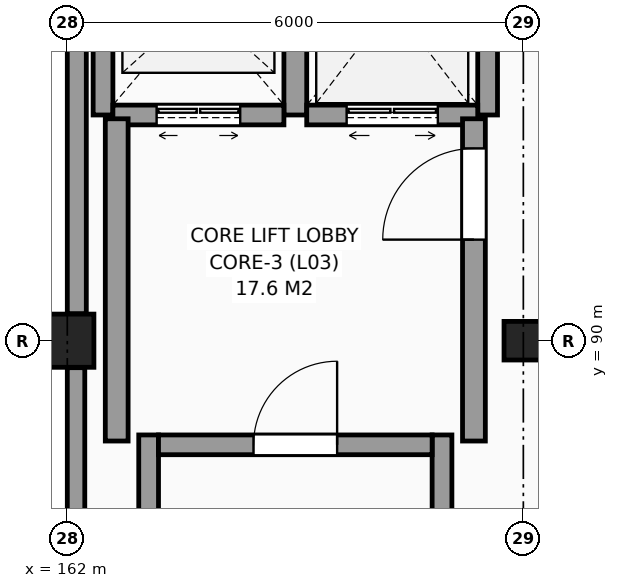
"""IFC4 building model, lengths in metres.
Left out: names, types, materials, properties, quantities, classifications, styles, units other than length and angle.
Written with IfcOpenShell. Run it as: python <this file> out.ifc"""

import sys

from ifc_helpers import new_model, si_unit, direction, frame, frame_2d, origin, origin_2d, place, context, subcontext, project, spatial, rectangle, circle, hollow_circle, extrude, element, fill, save


model = new_model("IFC4")
c1 = context("Model", 3, precision=1e-05, world=origin(), true_north=direction((0.0, 1.0)))
c2 = subcontext(c1, "Body", "Model", "MODEL_VIEW")
j1 = project(units=[si_unit("LENGTHUNIT", "METRE"), si_unit("PLANEANGLEUNIT", "RADIAN")], contexts=[c1])
p1 = place(None, origin())
s1 = spatial("IfcSite", under=j1, at=p1, CompositionType="ELEMENT")
p2 = place(p1, origin())
s2 = spatial("IfcBuilding", under=s1, at=p2, CompositionType="ELEMENT")
p3 = place(p2, frame((0.0, 0.0, 15.0)))
s3 = spatial("IfcBuildingStorey", under=s2, at=p3, CompositionType="ELEMENT", Elevation=15.0)
p4 = place(p3, frame((162.0, 90.0, 0.0), z_axis=(0.0, 0.0, 1.0), x_axis=(1.0, 0.0, 0.0)))
e1 = element("IfcColumn", 1, at=p4, inside=s3, PredefinedType="COLUMN", context=c2, shape_type="SweptSolid", body=[
    extrude(circle(Radius=0.35, at=origin_2d()), origin(), (0.0, 0.0, 1.0), 4.8),
])
p5 = place(p3, frame((168.0, 90.0, 0.0), z_axis=(0.0, 0.0, 1.0), x_axis=(1.0, 0.0, 0.0)))
e2 = element("IfcColumn", 2, at=p5, inside=s3, PredefinedType="COLUMN", context=c2, shape_type="SweptSolid", body=[
    extrude(hollow_circle(Radius=0.254, WallThickness=0.025, at=origin_2d()), origin(), (0.0, 0.0, 1.0), 4.8),
])
p6 = place(p3, frame((162.125, 95.741, 0.0), z_axis=(0.0, 0.0, 1.0), x_axis=(0.0, -1.0, 0.0)))
e3 = element("IfcWall", 3, at=p6, inside=s3, PredefinedType="SOLIDWALL", context=c2, shape_type="SweptSolid", body=[
    extrude(rectangle(XDim=5.386, YDim=0.25, at=frame_2d((2.693, 0.0))), origin(), (0.0, 0.0, 1.0), 3.7),
])
p7 = place(p3, frame((162.115, 89.645, 0.0), z_axis=(0.0, 0.0, 1.0), x_axis=(0.0, -1.0, 0.0)))
e4 = element("IfcWall", 4, at=p7, inside=s3, PredefinedType="SOLIDWALL", context=c2, shape_type="SweptSolid", body=[
    extrude(rectangle(XDim=5.315, YDim=0.23, at=frame_2d((2.657, 0.0))), origin(), (0.0, 0.0, 1.0), 3.7),
])
for number, where, z_axis, x_axis in (
    (5, (163.07, 78.04, 0.0), (0.0, 0.0, 1.0), (0.0, 1.0, 0.0)),
    (6, (166.93, 78.04, 0.0), (0.0, 0.0, 1.0), (0.0, 1.0, 0.0)),
):
    element("IfcWall", number, at=place(p3, frame(where, z_axis=z_axis, x_axis=x_axis)), inside=s3, PredefinedType="SHEAR", context=c2, shape_type="SweptSolid", body=[
        extrude(rectangle(XDim=10.72, YDim=0.26, at=frame_2d((5.36, 0.0))), origin(), (0.0, 0.0, 1.0), 4.8),
    ])
p8 = place(p3, frame((163.2, 88.63, 0.0), z_axis=(0.0, 0.0, 1.0), x_axis=(1.0, 0.0, 0.0)))
e7 = element("IfcWall", 7, at=p8, inside=s3, PredefinedType="SHEAR", context=c2, shape_type="SweptSolid", body=[
    extrude(rectangle(XDim=3.6, YDim=0.26, at=frame_2d((1.8, 0.0))), origin(), (0.0, 0.0, 1.0), 4.8),
])
p9 = place(p8, frame((1.25, 0.0, 0.0)))
e8 = element("IfcOpeningElement", 8, at=p9, cuts=e7, PredefinedType="OPENING", context=c2, shape_type="SweptSolid", body=[
    extrude(rectangle(XDim=1.1, YDim=2.15, at=frame_2d((0.55, 1.075))), frame((0.0, 0.14, 0.0), z_axis=(0.0, -1.0, 0.0), x_axis=(1.0, 0.0, 0.0)), (0.0, 0.0, 1.0), 0.28),
])
p10 = place(p3, frame((162.47, 92.97, 0.0), z_axis=(0.0, 0.0, 1.0), x_axis=(0.0, 1.0, 0.0)))
e9 = element("IfcWall", 9, at=p10, inside=s3, PredefinedType="SHEAR", context=c2, shape_type="SweptSolid", body=[
    extrude(rectangle(XDim=2.91, YDim=0.26, at=frame_2d((1.455, 0.0))), origin(), (0.0, 0.0, 1.0), 4.8),
])
p11 = place(p3, frame((165.0, 92.97, 0.0), z_axis=(0.0, 0.0, 1.0), x_axis=(0.0, 1.0, 0.0)))
e10 = element("IfcWall", 10, at=p11, inside=s3, PredefinedType="SHEAR", context=c2, shape_type="SweptSolid", body=[
    extrude(rectangle(XDim=2.91, YDim=0.3, at=frame_2d((1.455, 0.0))), origin(), (0.0, 0.0, 1.0), 4.8),
])
p12 = place(p3, frame((162.6, 92.97, 0.0), z_axis=(0.0, 0.0, 1.0), x_axis=(1.0, 0.0, 0.0)))
e11 = element("IfcWall", 11, at=p12, inside=s3, PredefinedType="SHEAR", context=c2, shape_type="SweptSolid", body=[
    extrude(rectangle(XDim=2.25, YDim=0.26, at=frame_2d((1.125, 0.0))), origin(), (0.0, 0.0, 1.0), 4.8),
])
p13 = place(p12, frame((0.575, 0.0, 0.0)))
e12 = element("IfcOpeningElement", 12, at=p13, cuts=e11, PredefinedType="OPENING", context=c2, shape_type="SweptSolid", body=[
    extrude(rectangle(XDim=1.1, YDim=2.2, at=frame_2d((0.55, 1.1))), frame((0.0, 0.14, 0.0), z_axis=(0.0, -1.0, 0.0), x_axis=(1.0, 0.0, 0.0)), (0.0, 0.0, 1.0), 0.28),
])
p14 = place(p3, frame((167.53, 92.97, 0.0), z_axis=(0.0, 0.0, 1.0), x_axis=(0.0, 1.0, 0.0)))
e13 = element("IfcWall", 13, at=p14, inside=s3, PredefinedType="SHEAR", context=c2, shape_type="SweptSolid", body=[
    extrude(rectangle(XDim=2.91, YDim=0.26, at=frame_2d((1.455, 0.0))), origin(), (0.0, 0.0, 1.0), 4.8),
])
p15 = place(p3, frame((165.15, 92.97, 0.0), z_axis=(0.0, 0.0, 1.0), x_axis=(1.0, 0.0, 0.0)))
e14 = element("IfcWall", 14, at=p15, inside=s3, PredefinedType="SHEAR", context=c2, shape_type="SweptSolid", body=[
    extrude(rectangle(XDim=2.25, YDim=0.26, at=frame_2d((1.125, 0.0))), origin(), (0.0, 0.0, 1.0), 4.8),
])
p16 = place(p15, frame((0.525, 0.0, 0.0)))
e15 = element("IfcOpeningElement", 15, at=p16, cuts=e14, PredefinedType="OPENING", context=c2, shape_type="SweptSolid", body=[
    extrude(rectangle(XDim=1.2, YDim=2.25, at=frame_2d((0.6, 1.125))), frame((0.0, 0.14, 0.0), z_axis=(0.0, -1.0, 0.0), x_axis=(1.0, 0.0, 0.0)), (0.0, 0.0, 1.0), 0.28),
])
p17 = place(p3, frame((167.35, 88.68, 0.0), z_axis=(0.0, 0.0, 1.0), x_axis=(0.0, 1.0, 0.0)))
e16 = element("IfcWall", 16, at=p17, inside=s3, PredefinedType="SHEAR", context=c2, shape_type="SweptSolid", body=[
    extrude(rectangle(XDim=4.24, YDim=0.3, at=frame_2d((2.12, 0.0))), origin(), (0.0, 0.0, 1.0), 4.8),
])
p18 = place(p17, frame((2.65, 0.0, 0.0)))
e17 = element("IfcOpeningElement", 17, at=p18, cuts=e16, PredefinedType="OPENING", context=c2, shape_type="SweptSolid", body=[
    extrude(rectangle(XDim=1.2, YDim=2.2, at=frame_2d((0.6, 1.1))), frame((0.0, 0.16, 0.0), z_axis=(0.0, -1.0, 0.0), x_axis=(1.0, 0.0, 0.0)), (0.0, 0.0, 1.0), 0.32),
])
p19 = place(p3, frame((162.65, 88.68, 0.0), z_axis=(0.0, 0.0, 1.0), x_axis=(0.0, 1.0, 0.0)))
e18 = element("IfcWall", 18, at=p19, inside=s3, PredefinedType="SHEAR", context=c2, shape_type="SweptSolid", body=[
    extrude(rectangle(XDim=4.24, YDim=0.3, at=frame_2d((2.12, 0.0))), origin(), (0.0, 0.0, 1.0), 4.8),
])
p20 = place(p9, origin())
e19 = element("IfcDoor", 19, at=p20, inside=s3, OperationType="SINGLE_SWING_RIGHT", PredefinedType="DOOR", context=c2, shape_type="SweptSolid", body=[
    extrude(rectangle(XDim=1.1, YDim=2.15, at=frame_2d((0.55, 1.075))), frame((0.0, 0.025, 0.0), z_axis=(0.0, -1.0, 0.0), x_axis=(1.0, 0.0, 0.0)), (0.0, 0.0, 1.0), 0.05),
])
fill(e8, e19)
p21 = place(p13, origin())
e20 = element("IfcDoor", 20, at=p21, inside=s3, OperationType="DOUBLE_DOOR_SLIDING", PredefinedType="DOOR", context=c2, shape_type="SweptSolid", body=[
    extrude(rectangle(XDim=1.1, YDim=2.2, at=frame_2d((0.55, 1.1))), frame((0.0, 0.025, 0.0), z_axis=(0.0, -1.0, 0.0), x_axis=(1.0, 0.0, 0.0)), (0.0, 0.0, 1.0), 0.05),
])
fill(e12, e20)
p22 = place(p16, origin())
e21 = element("IfcDoor", 21, at=p22, inside=s3, OperationType="DOUBLE_DOOR_SLIDING", PredefinedType="DOOR", context=c2, shape_type="SweptSolid", body=[
    extrude(rectangle(XDim=1.2, YDim=2.25, at=frame_2d((0.6, 1.125))), frame((0.0, 0.025, 0.0), z_axis=(0.0, -1.0, 0.0), x_axis=(1.0, 0.0, 0.0)), (0.0, 0.0, 1.0), 0.05),
])
fill(e15, e21)
p23 = place(p18, origin())
e22 = element("IfcDoor", 22, at=p23, inside=s3, OperationType="SINGLE_SWING_LEFT", PredefinedType="DOOR", context=c2, shape_type="SweptSolid", body=[
    extrude(rectangle(XDim=1.2, YDim=2.2, at=frame_2d((0.6, 1.1))), frame((0.0, 0.025, 0.0), z_axis=(0.0, -1.0, 0.0), x_axis=(1.0, 0.0, 0.0)), (0.0, 0.0, 1.0), 0.05),
])
fill(e17, e22)
save(model, sys.argv[1])
